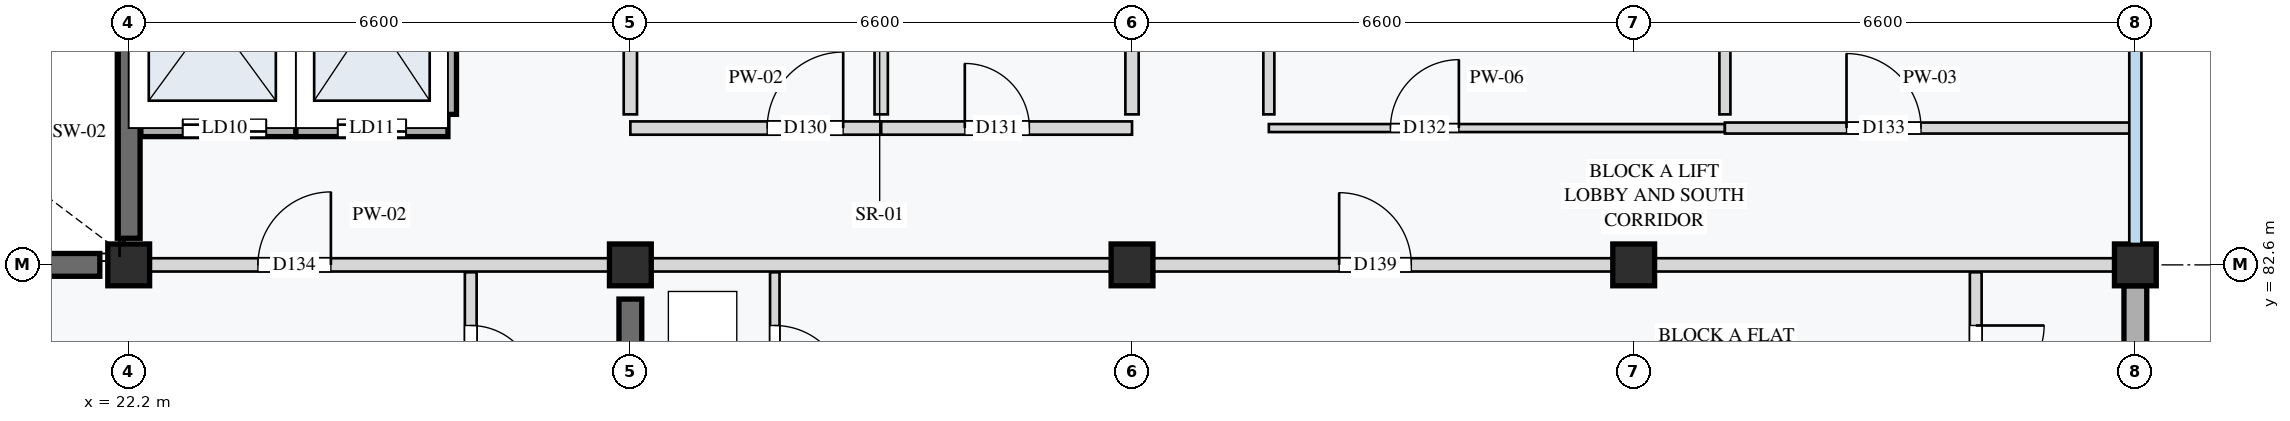
"""IFC4 building model, lengths in metres.
Left out: names, types, materials, properties, quantities, classifications, styles, units other than length and angle.
Written with IfcOpenShell. Run it as: python <this file> out.ifc"""

import sys

from ifc_helpers import new_model, si_unit, direction, frame, frame_2d, origin, origin_2d, place, context, subcontext, project, spatial, rectangle, extrude, element, fill, save


model = new_model("IFC4")
c1 = context("Model", 3, precision=1e-05, world=origin(), true_north=direction((0.0, 1.0)))
c2 = subcontext(c1, "Body", "Model", "MODEL_VIEW")
j1 = project(units=[si_unit("LENGTHUNIT", "METRE"), si_unit("PLANEANGLEUNIT", "RADIAN")], contexts=[c1])
p1 = place(None, origin())
s1 = spatial("IfcSite", under=j1, at=p1, CompositionType="ELEMENT")
p2 = place(p1, origin())
s2 = spatial("IfcBuilding", under=s1, at=p2, CompositionType="ELEMENT")
p3 = place(p2, frame((0.0, 0.0, 14.8)))
s3 = spatial("IfcBuildingStorey", under=s2, at=p3, CompositionType="ELEMENT", Elevation=14.8)
for number, where, z_axis, x_axis in (
    (1, (22.2, 82.6, 0.0), (0.0, 0.0, 1.0), (1.0, 0.0, 0.0)),
    (2, (28.8, 82.6, 0.0), (0.0, 0.0, 1.0), (1.0, 0.0, 0.0)),
    (3, (35.4, 82.6, 0.0), (0.0, 0.0, 1.0), (1.0, 0.0, 0.0)),
    (4, (42.0, 82.6, 0.0), (0.0, 0.0, 1.0), (1.0, 0.0, 0.0)),
    (5, (48.6, 82.6, 0.0), (0.0, 0.0, 1.0), (1.0, 0.0, 0.0)),
):
    element("IfcColumn", number, at=place(p3, frame(where, z_axis=z_axis, x_axis=x_axis)), inside=s3, PredefinedType="COLUMN", context=c2, shape_type="SweptSolid", body=[
        extrude(rectangle(XDim=0.55, YDim=0.55, at=origin_2d()), origin(), (0.0, 0.0, 1.0), 3.2),
    ])
p4 = place(p3, frame((15.98, 82.6, 0.0), z_axis=(0.0, 0.0, 1.0), x_axis=(1.0, 0.0, 0.0)))
e6 = element("IfcWall", 6, at=p4, inside=s3, PredefinedType="SHEAR", context=c2, shape_type="SweptSolid", body=[
    extrude(rectangle(XDim=5.84, YDim=0.3, at=frame_2d((2.92, 0.0))), origin(), (0.0, 0.0, 1.0), 2.96),
])
p5 = place(p3, frame((22.2, 82.95, 0.0), z_axis=(0.0, 0.0, 1.0), x_axis=(0.0, 1.0, 0.0)))
e7 = element("IfcWall", 7, at=p5, inside=s3, PredefinedType="SHEAR", context=c2, shape_type="SweptSolid", body=[
    extrude(rectangle(XDim=2.8, YDim=0.3, at=frame_2d((1.4, 0.0))), origin(), (0.0, 0.0, 1.0), 2.96),
])
p6 = place(p3, frame((28.8, 76.45, 0.0), z_axis=(0.0, 0.0, 1.0), x_axis=(0.0, 1.0, 0.0)))
e8 = element("IfcWall", 8, at=p6, inside=s3, PredefinedType="SHEAR", context=c2, shape_type="SweptSolid", body=[
    extrude(rectangle(XDim=5.7, YDim=0.3, at=frame_2d((2.85, 0.0))), origin(), (0.0, 0.0, 1.0), 2.96),
])
p7 = place(p3, frame((48.6, 76.275, 0.0), z_axis=(0.0, 0.0, 1.0), x_axis=(0.0, 1.0, 0.0)))
e9 = element("IfcWall", 9, at=p7, inside=s3, PredefinedType="STANDARD", context=c2, shape_type="SweptSolid", body=[
    extrude(rectangle(XDim=6.05, YDim=0.3, at=frame_2d((3.025, 0.0))), origin(), (0.0, 0.0, 1.0), 2.65),
])
p8 = place(p3, frame((22.36, 84.4, 0.0), z_axis=(0.0, 0.0, 1.0), x_axis=(1.0, 0.0, 0.0)))
e10 = element("IfcWall", 10, at=p8, inside=s3, PredefinedType="STANDARD", context=c2, shape_type="SweptSolid", body=[
    extrude(rectangle(XDim=2.04, YDim=0.225, at=frame_2d((1.02, 0.0))), origin(), (0.0, 0.0, 1.0), 2.96),
])
p9 = place(p8, frame((0.55, 0.0, 0.0)))
e11 = element("IfcOpeningElement", 11, at=p9, cuts=e10, PredefinedType="OPENING", context=c2, shape_type="SweptSolid", body=[
    extrude(rectangle(XDim=1.1, YDim=2.1, at=frame_2d((0.55, 1.05))), frame((0.0, 0.123, 0.0), z_axis=(0.0, -1.0, 0.0), x_axis=(1.0, 0.0, 0.0)), (0.0, 0.0, 1.0), 0.245),
])
p10 = place(p3, frame((24.4, 84.4, 0.0), z_axis=(0.0, 0.0, 1.0), x_axis=(1.0, 0.0, 0.0)))
e12 = element("IfcWall", 12, at=p10, inside=s3, PredefinedType="STANDARD", context=c2, shape_type="SweptSolid", body=[
    extrude(rectangle(XDim=2.0, YDim=0.225, at=frame_2d((1.0, 0.0))), origin(), (0.0, 0.0, 1.0), 2.96),
])
p11 = place(p10, frame((0.55, 0.0, 0.0)))
e13 = element("IfcOpeningElement", 13, at=p11, cuts=e12, PredefinedType="OPENING", context=c2, shape_type="SweptSolid", body=[
    extrude(rectangle(XDim=0.9, YDim=2.1, at=frame_2d((0.45, 1.05))), frame((0.0, 0.123, 0.0), z_axis=(0.0, -1.0, 0.0), x_axis=(1.0, 0.0, 0.0)), (0.0, 0.0, 1.0), 0.245),
])
for number, where, z_axis, x_axis in (
    (14, (24.4, 84.58, 0.0), (0.0, 0.0, 1.0), (0.0, 1.0, 0.0)),
    (15, (26.4, 84.58, 0.0), (0.0, 0.0, 1.0), (0.0, 1.0, 0.0)),
):
    element("IfcWall", number, at=place(p3, frame(where, z_axis=z_axis, x_axis=x_axis)), inside=s3, PredefinedType="STANDARD", context=c2, shape_type="SweptSolid", body=[
        extrude(rectangle(XDim=2.64, YDim=0.225, at=frame_2d((1.32, 0.0))), origin(), (0.0, 0.0, 1.0), 2.96),
    ])
p12 = place(p3, frame((28.8, 84.4, 0.0), z_axis=(0.0, 0.0, 1.0), x_axis=(1.0, 0.0, 0.0)))
e16 = element("IfcWall", 16, at=p12, inside=s3, PredefinedType="PARTITIONING", context=c2, shape_type="SweptSolid", body=[
    extrude(rectangle(XDim=3.3, YDim=0.175, at=frame_2d((1.65, 0.0))), origin(), (0.0, 0.0, 1.0), 2.96),
])
p13 = place(p12, frame((1.8, 0.0, 0.0)))
e17 = element("IfcOpeningElement", 17, at=p13, cuts=e16, PredefinedType="OPENING", context=c2, shape_type="SweptSolid", body=[
    extrude(rectangle(XDim=1.0, YDim=2.1, at=frame_2d((0.5, 1.05))), frame((0.0, 0.097, 0.0), z_axis=(0.0, -1.0, 0.0), x_axis=(1.0, 0.0, 0.0)), (0.0, 0.0, 1.0), 0.195),
])
p14 = place(p3, frame((32.1, 84.4, 0.0), z_axis=(0.0, 0.0, 1.0), x_axis=(1.0, 0.0, 0.0)))
e18 = element("IfcWall", 18, at=p14, inside=s3, PredefinedType="PARTITIONING", context=c2, shape_type="SweptSolid", body=[
    extrude(rectangle(XDim=3.3, YDim=0.175, at=frame_2d((1.65, 0.0))), origin(), (0.0, 0.0, 1.0), 2.96),
])
p15 = place(p14, frame((1.1, 0.0, 0.0)))
e19 = element("IfcOpeningElement", 19, at=p15, cuts=e18, PredefinedType="OPENING", context=c2, shape_type="SweptSolid", body=[
    extrude(rectangle(XDim=0.85, YDim=2.0, at=frame_2d((0.425, 1.0))), frame((0.0, 0.097, 0.0), z_axis=(0.0, -1.0, 0.0), x_axis=(1.0, 0.0, 0.0)), (0.0, 0.0, 1.0), 0.195),
])
for number, where, z_axis, x_axis in (
    (20, (28.8, 84.58, 0.0), (0.0, 0.0, 1.0), (0.0, 1.0, 0.0)),
    (21, (32.1, 84.58, 0.0), (0.0, 0.0, 1.0), (0.0, 1.0, 0.0)),
    (22, (35.4, 84.58, 0.0), (0.0, 0.0, 1.0), (0.0, 1.0, 0.0)),
):
    element("IfcWall", number, at=place(p3, frame(where, z_axis=z_axis, x_axis=x_axis)), inside=s3, PredefinedType="PARTITIONING", context=c2, shape_type="SweptSolid", body=[
        extrude(rectangle(XDim=1.14, YDim=0.175, at=frame_2d((0.57, 0.0))), origin(), (0.0, 0.0, 1.0), 2.96),
    ])
p16 = place(p3, frame((37.2, 84.4, 0.0), z_axis=(0.0, 0.0, 1.0), x_axis=(1.0, 0.0, 0.0)))
e23 = element("IfcWall", 23, at=p16, inside=s3, PredefinedType="PARTITIONING", context=c2, shape_type="SweptSolid", body=[
    extrude(rectangle(XDim=6.0, YDim=0.105, at=frame_2d((3.0, 0.0))), origin(), (0.0, 0.0, 1.0), 2.96),
])
p17 = place(p16, frame((1.6, 0.0, 0.0)))
e24 = element("IfcOpeningElement", 24, at=p17, cuts=e23, PredefinedType="OPENING", context=c2, shape_type="SweptSolid", body=[
    extrude(rectangle(XDim=0.9, YDim=2.16, at=frame_2d((0.45, 1.08))), frame((0.0, 0.062, 0.0), z_axis=(0.0, -1.0, 0.0), x_axis=(1.0, 0.0, 0.0)), (0.0, 0.0, 1.0), 0.125),
])
p18 = place(p3, frame((43.2, 84.4, 0.0), z_axis=(0.0, 0.0, 1.0), x_axis=(1.0, 0.0, 0.0)))
e25 = element("IfcWall", 25, at=p18, inside=s3, PredefinedType="PARTITIONING", context=c2, shape_type="SweptSolid", body=[
    extrude(rectangle(XDim=5.4, YDim=0.145, at=frame_2d((2.7, 0.0))), origin(), (0.0, 0.0, 1.0), 2.96),
])
p19 = place(p18, frame((1.6, 0.0, 0.0)))
e26 = element("IfcOpeningElement", 26, at=p19, cuts=e25, PredefinedType="OPENING", context=c2, shape_type="SweptSolid", body=[
    extrude(rectangle(XDim=0.98, YDim=2.12, at=frame_2d((0.49, 1.06))), frame((0.0, 0.083, 0.0), z_axis=(0.0, -1.0, 0.0), x_axis=(1.0, 0.0, 0.0)), (0.0, 0.0, 1.0), 0.165),
])
for number, where, z_axis, x_axis in (
    (27, (43.2, 84.58, 0.0), (0.0, 0.0, 1.0), (0.0, 1.0, 0.0)),
    (28, (37.2, 84.58, 0.0), (0.0, 0.0, 1.0), (0.0, 1.0, 0.0)),
):
    element("IfcWall", number, at=place(p3, frame(where, z_axis=z_axis, x_axis=x_axis)), inside=s3, PredefinedType="PARTITIONING", context=c2, shape_type="SweptSolid", body=[
        extrude(rectangle(XDim=2.64, YDim=0.145, at=frame_2d((1.32, 0.0))), origin(), (0.0, 0.0, 1.0), 2.96),
    ])
p20 = place(p3, frame((22.2, 82.6, 0.0), z_axis=(0.0, 0.0, 1.0), x_axis=(1.0, 0.0, 0.0)))
e29 = element("IfcWall", 29, at=p20, inside=s3, PredefinedType="PARTITIONING", context=c2, shape_type="SweptSolid", body=[
    extrude(rectangle(XDim=6.6, YDim=0.175, at=frame_2d((3.3, 0.0))), origin(), (0.0, 0.0, 1.0), 2.7),
])
p21 = place(p20, frame((1.7, 0.0, 0.0)))
e30 = element("IfcOpeningElement", 30, at=p21, cuts=e29, PredefinedType="OPENING", context=c2, shape_type="SweptSolid", body=[
    extrude(rectangle(XDim=0.96, YDim=2.18, at=frame_2d((0.48, 1.09))), frame((0.0, 0.097, 0.0), z_axis=(0.0, -1.0, 0.0), x_axis=(1.0, 0.0, 0.0)), (0.0, 0.0, 1.0), 0.195),
])
p22 = place(p3, frame((26.7, 82.502, 0.0), z_axis=(0.0, 0.0, 1.0), x_axis=(0.0, -1.0, 0.0)))
e31 = element("IfcWall", 31, at=p22, inside=s3, PredefinedType="PARTITIONING", context=c2, shape_type="SweptSolid", body=[
    extrude(rectangle(XDim=2.302, YDim=0.155, at=frame_2d((1.151, 0.0))), origin(), (0.0, 0.0, 1.0), 2.96),
])
p23 = place(p22, frame((0.7, 0.0, 0.0)))
e32 = element("IfcOpeningElement", 32, at=p23, cuts=e31, PredefinedType="OPENING", context=c2, shape_type="SweptSolid", body=[
    extrude(rectangle(XDim=0.86, YDim=2.12, at=frame_2d((0.43, 1.06))), frame((0.0, 0.087, 0.0), z_axis=(0.0, -1.0, 0.0), x_axis=(1.0, 0.0, 0.0)), (0.0, 0.0, 1.0), 0.175),
])
p24 = place(p3, frame((28.8, 82.6, 0.0), z_axis=(0.0, 0.0, 1.0), x_axis=(1.0, 0.0, 0.0)))
e33 = element("IfcWall", 33, at=p24, inside=s3, PredefinedType="PARTITIONING", context=c2, shape_type="SweptSolid", body=[
    extrude(rectangle(XDim=19.8, YDim=0.175, at=frame_2d((9.9, 0.0))), origin(), (0.0, 0.0, 1.0), 2.7),
])
p25 = place(p24, frame((9.325, 0.0, 0.0)))
e34 = element("IfcOpeningElement", 34, at=p25, cuts=e33, PredefinedType="OPENING", context=c2, shape_type="SweptSolid", body=[
    extrude(rectangle(XDim=0.95, YDim=2.1, at=frame_2d((0.475, 1.05))), frame((0.0, 0.097, 0.0), z_axis=(0.0, -1.0, 0.0), x_axis=(1.0, 0.0, 0.0)), (0.0, 0.0, 1.0), 0.195),
])
p26 = place(p3, frame((30.7, 82.502, 0.0), z_axis=(0.0, 0.0, 1.0), x_axis=(0.0, -1.0, 0.0)))
e35 = element("IfcWall", 35, at=p26, inside=s3, PredefinedType="PARTITIONING", context=c2, shape_type="SweptSolid", body=[
    extrude(rectangle(XDim=2.302, YDim=0.125, at=frame_2d((1.151, 0.0))), origin(), (0.0, 0.0, 1.0), 2.96),
])
p27 = place(p26, frame((0.7, 0.0, 0.0)))
e36 = element("IfcOpeningElement", 36, at=p27, cuts=e35, PredefinedType="OPENING", context=c2, shape_type="SweptSolid", body=[
    extrude(rectangle(XDim=0.94, YDim=2.08, at=frame_2d((0.47, 1.04))), frame((0.0, 0.073, 0.0), z_axis=(0.0, -1.0, 0.0), x_axis=(1.0, 0.0, 0.0)), (0.0, 0.0, 1.0), 0.145),
])
p28 = place(p3, frame((46.5, 82.502, 0.0), z_axis=(0.0, 0.0, 1.0), x_axis=(0.0, -1.0, 0.0)))
e37 = element("IfcWall", 37, at=p28, inside=s3, PredefinedType="PARTITIONING", context=c2, shape_type="SweptSolid", body=[
    extrude(rectangle(XDim=2.302, YDim=0.155, at=frame_2d((1.151, 0.0))), origin(), (0.0, 0.0, 1.0), 2.96),
])
p29 = place(p28, frame((0.7, 0.0, 0.0)))
e38 = element("IfcOpeningElement", 38, at=p29, cuts=e37, PredefinedType="OPENING", context=c2, shape_type="SweptSolid", body=[
    extrude(rectangle(XDim=0.9, YDim=2.16, at=frame_2d((0.45, 1.08))), frame((0.0, 0.087, 0.0), z_axis=(0.0, -1.0, 0.0), x_axis=(1.0, 0.0, 0.0)), (0.0, 0.0, 1.0), 0.175),
])
p30 = place(p9, origin())
e39 = element("IfcDoor", 39, at=p30, inside=s3, OperationType="DOUBLE_DOOR_SLIDING", PredefinedType="DOOR", context=c2, shape_type="SweptSolid", body=[
    extrude(rectangle(XDim=1.1, YDim=2.1, at=frame_2d((0.55, 1.05))), frame((0.0, 0.025, 0.0), z_axis=(0.0, -1.0, 0.0), x_axis=(1.0, 0.0, 0.0)), (0.0, 0.0, 1.0), 0.05),
])
fill(e11, e39)
p31 = place(p11, origin())
e40 = element("IfcDoor", 40, at=p31, inside=s3, OperationType="DOUBLE_DOOR_SLIDING", PredefinedType="DOOR", context=c2, shape_type="SweptSolid", body=[
    extrude(rectangle(XDim=0.9, YDim=2.1, at=frame_2d((0.45, 1.05))), frame((0.0, 0.025, 0.0), z_axis=(0.0, -1.0, 0.0), x_axis=(1.0, 0.0, 0.0)), (0.0, 0.0, 1.0), 0.05),
])
fill(e13, e40)
p32 = place(p13, origin())
e41 = element("IfcDoor", 41, at=p32, inside=s3, OperationType="SINGLE_SWING_RIGHT", PredefinedType="DOOR", context=c2, shape_type="SweptSolid", body=[
    extrude(rectangle(XDim=1.0, YDim=2.1, at=frame_2d((0.5, 1.05))), frame((0.0, 0.025, 0.0), z_axis=(0.0, -1.0, 0.0), x_axis=(1.0, 0.0, 0.0)), (0.0, 0.0, 1.0), 0.05),
])
fill(e17, e41)
p33 = place(p15, origin())
e42 = element("IfcDoor", 42, at=p33, inside=s3, OperationType="SINGLE_SWING_LEFT", PredefinedType="DOOR", context=c2, shape_type="SweptSolid", body=[
    extrude(rectangle(XDim=0.85, YDim=2.0, at=frame_2d((0.425, 1.0))), frame((0.0, 0.025, 0.0), z_axis=(0.0, -1.0, 0.0), x_axis=(1.0, 0.0, 0.0)), (0.0, 0.0, 1.0), 0.05),
])
fill(e19, e42)
p34 = place(p17, origin())
e43 = element("IfcDoor", 43, at=p34, inside=s3, OperationType="SINGLE_SWING_RIGHT", PredefinedType="DOOR", context=c2, shape_type="SweptSolid", body=[
    extrude(rectangle(XDim=0.9, YDim=2.16, at=frame_2d((0.45, 1.08))), frame((0.0, 0.025, 0.0), z_axis=(0.0, -1.0, 0.0), x_axis=(1.0, 0.0, 0.0)), (0.0, 0.0, 1.0), 0.05),
])
fill(e24, e43)
p35 = place(p19, origin())
e44 = element("IfcDoor", 44, at=p35, inside=s3, OperationType="SINGLE_SWING_LEFT", PredefinedType="DOOR", context=c2, shape_type="SweptSolid", body=[
    extrude(rectangle(XDim=0.98, YDim=2.12, at=frame_2d((0.49, 1.06))), frame((0.0, 0.025, 0.0), z_axis=(0.0, -1.0, 0.0), x_axis=(1.0, 0.0, 0.0)), (0.0, 0.0, 1.0), 0.05),
])
fill(e26, e44)
p36 = place(p21, origin())
e45 = element("IfcDoor", 45, at=p36, inside=s3, OperationType="SINGLE_SWING_RIGHT", PredefinedType="DOOR", context=c2, shape_type="SweptSolid", body=[
    extrude(rectangle(XDim=0.96, YDim=2.18, at=frame_2d((0.48, 1.09))), frame((0.0, 0.025, 0.0), z_axis=(0.0, -1.0, 0.0), x_axis=(1.0, 0.0, 0.0)), (0.0, 0.0, 1.0), 0.05),
])
fill(e30, e45)
p37 = place(p23, origin())
e46 = element("IfcDoor", 46, at=p37, inside=s3, OperationType="SINGLE_SWING_RIGHT", PredefinedType="DOOR", context=c2, shape_type="SweptSolid", body=[
    extrude(rectangle(XDim=0.86, YDim=2.12, at=frame_2d((0.43, 1.06))), frame((0.0, 0.025, 0.0), z_axis=(0.0, -1.0, 0.0), x_axis=(1.0, 0.0, 0.0)), (0.0, 0.0, 1.0), 0.05),
])
fill(e32, e46)
p38 = place(p25, origin())
e47 = element("IfcDoor", 47, at=p38, inside=s3, OperationType="SINGLE_SWING_LEFT", PredefinedType="DOOR", context=c2, shape_type="SweptSolid", body=[
    extrude(rectangle(XDim=0.95, YDim=2.1, at=frame_2d((0.475, 1.05))), frame((0.0, 0.025, 0.0), z_axis=(0.0, -1.0, 0.0), x_axis=(1.0, 0.0, 0.0)), (0.0, 0.0, 1.0), 0.05),
])
fill(e34, e47)
p39 = place(p27, origin())
e48 = element("IfcDoor", 48, at=p39, inside=s3, OperationType="SINGLE_SWING_RIGHT", PredefinedType="DOOR", context=c2, shape_type="SweptSolid", body=[
    extrude(rectangle(XDim=0.94, YDim=2.08, at=frame_2d((0.47, 1.04))), frame((0.0, 0.025, 0.0), z_axis=(0.0, -1.0, 0.0), x_axis=(1.0, 0.0, 0.0)), (0.0, 0.0, 1.0), 0.05),
])
fill(e36, e48)
p40 = place(p29, origin())
e49 = element("IfcDoor", 49, at=p40, inside=s3, OperationType="SINGLE_SWING_LEFT", PredefinedType="DOOR", context=c2, shape_type="SweptSolid", body=[
    extrude(rectangle(XDim=0.9, YDim=2.16, at=frame_2d((0.45, 1.08))), frame((0.0, 0.025, 0.0), z_axis=(0.0, -1.0, 0.0), x_axis=(1.0, 0.0, 0.0)), (0.0, 0.0, 1.0), 0.05),
])
fill(e38, e49)
save(model, sys.argv[1])
